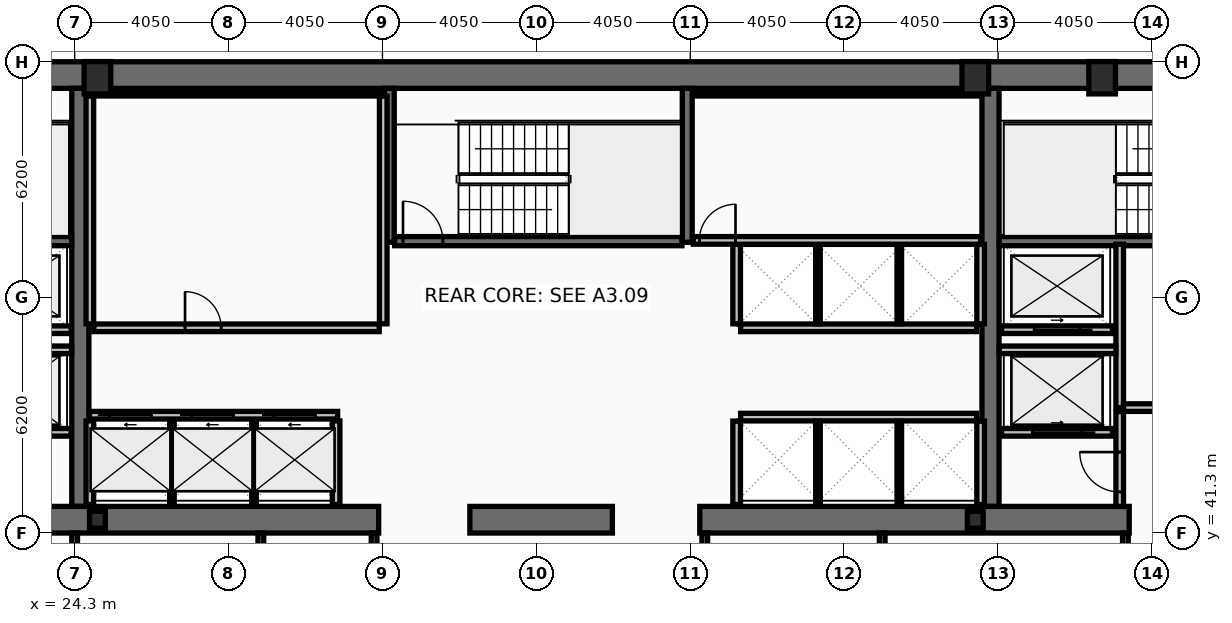
"""IFC4 building model, lengths in metres.
Left out: names, types, materials, properties, quantities, classifications, styles, units other than length and angle.
Written with IfcOpenShell. Run it as: python <this file> out.ifc"""

import sys

from ifc_helpers import new_model, si_unit, direction, frame, frame_2d, origin, origin_2d, place, context, subcontext, project, spatial, rectangle, hollow_rectangle, i_section, extrude, element, fill, save


model = new_model("IFC4")
c1 = context("Model", 3, precision=1e-05, world=origin(), true_north=direction((0.0, 1.0)))
c2 = subcontext(c1, "Body", "Model", "MODEL_VIEW")
j1 = project(units=[si_unit("LENGTHUNIT", "METRE"), si_unit("PLANEANGLEUNIT", "RADIAN")], contexts=[c1])
p1 = place(None, origin())
s1 = spatial("IfcSite", under=j1, at=p1, CompositionType="ELEMENT")
p2 = place(p1, origin())
s2 = spatial("IfcBuilding", under=s1, at=p2, CompositionType="ELEMENT")
p3 = place(p2, frame((0.0, 0.0, 157.8)))
s3 = spatial("IfcBuildingStorey", under=s2, at=p3, CompositionType="ELEMENT", Elevation=157.8)
p4 = place(p3, frame((16.2, 53.35, 0.0), z_axis=(0.0, 0.0, 1.0), x_axis=(1.0, 0.0, 0.0)))
e1 = element("IfcWall", 1, at=p4, inside=s3, PredefinedType="SHEAR", context=c2, shape_type="SweptSolid", body=[
    extrude(rectangle(XDim=40.5, YDim=0.7, at=frame_2d((20.25, 0.0))), origin(), (0.0, 0.0, 1.0), 3.44),
])
for number, where, z_axis, x_axis in (
    (2, (24.45, 42.0, 0.0), (0.0, 0.0, 1.0), (0.0, 1.0, 0.0)),
    (3, (48.4, 42.0, 0.0), (0.0, 0.0, 1.0), (0.0, 1.0, 0.0)),
):
    element("IfcWall", number, at=place(p3, frame(where, z_axis=z_axis, x_axis=x_axis)), inside=s3, PredefinedType="SHEAR", context=c2, shape_type="SweptSolid", body=[
        extrude(rectangle(XDim=11.0, YDim=0.45, at=frame_2d((5.5, 0.0))), origin(), (0.0, 0.0, 1.0), 3.44),
    ])
p5 = place(p3, frame((32.3, 41.65, 0.0), z_axis=(0.0, 0.0, 1.0), x_axis=(-1.0, 0.0, 0.0)))
e4 = element("IfcWall", 4, at=p5, inside=s3, PredefinedType="SHEAR", context=c2, shape_type="SweptSolid", body=[
    extrude(rectangle(XDim=11.45, YDim=0.7, at=frame_2d((5.725, 0.0))), origin(), (0.0, 0.0, 1.0), 3.44),
])
p6 = place(p3, frame((38.45, 41.65, 0.0), z_axis=(0.0, 0.0, 1.0), x_axis=(-1.0, 0.0, 0.0)))
e5 = element("IfcWall", 5, at=p6, inside=s3, PredefinedType="SHEAR", context=c2, shape_type="SweptSolid", body=[
    extrude(rectangle(XDim=3.75, YDim=0.7, at=frame_2d((1.875, 0.0))), origin(), (0.0, 0.0, 1.0), 3.44),
])
p7 = place(p3, frame((52.05, 41.65, 0.0), z_axis=(0.0, 0.0, 1.0), x_axis=(-1.0, 0.0, 0.0)))
e6 = element("IfcWall", 6, at=p7, inside=s3, PredefinedType="SHEAR", context=c2, shape_type="SweptSolid", body=[
    extrude(rectangle(XDim=11.3, YDim=0.7, at=frame_2d((5.65, 0.0))), origin(), (0.0, 0.0, 1.0), 3.44),
])
for number, where, z_axis, x_axis in (
    (7, (32.58, 48.95, 0.0), (0.0, 0.0, 1.0), (0.0, 1.0, 0.0)),
    (8, (40.42, 48.95, 0.0), (0.0, 0.0, 1.0), (0.0, 1.0, 0.0)),
):
    element("IfcWall", number, at=place(p3, frame(where, z_axis=z_axis, x_axis=x_axis)), inside=s3, PredefinedType="SHEAR", context=c2, shape_type="SweptSolid", body=[
        extrude(rectangle(XDim=4.05, YDim=0.26, at=frame_2d((2.025, 0.0))), origin(), (0.0, 0.0, 1.0), 3.44),
    ])
p8 = place(p3, frame((16.9, 48.98, 0.0), z_axis=(0.0, 0.0, 1.0), x_axis=(1.0, 0.0, 0.0)))
e9 = element("IfcWall", 9, at=p8, inside=s3, PredefinedType="SHEAR", context=c2, shape_type="SweptSolid", body=[
    extrude(rectangle(XDim=7.32, YDim=0.24, at=frame_2d((3.66, 0.0))), origin(), (0.0, 0.0, 1.0), 3.44),
])
p9 = place(p8, frame((0.22, 0.0, 0.0)))
e10 = element("IfcOpeningElement", 10, at=p9, cuts=e9, PredefinedType="OPENING", context=c2, shape_type="SweptSolid", body=[
    extrude(rectangle(XDim=1.05, YDim=2.15, at=frame_2d((0.525, 1.075))), frame((0.0, 0.13, 0.0), z_axis=(0.0, -1.0, 0.0), x_axis=(1.0, 0.0, 0.0)), (0.0, 0.0, 1.0), 0.26),
])
p10 = place(p3, frame((48.63, 48.98, 0.0), z_axis=(0.0, 0.0, 1.0), x_axis=(1.0, 0.0, 0.0)))
e11 = element("IfcWall", 11, at=p10, inside=s3, PredefinedType="SHEAR", context=c2, shape_type="SweptSolid", body=[
    extrude(rectangle(XDim=7.37, YDim=0.24, at=frame_2d((3.685, 0.0))), origin(), (0.0, 0.0, 1.0), 3.44),
])
p11 = place(p10, frame((6.1, 0.0, 0.0)))
e12 = element("IfcOpeningElement", 12, at=p11, cuts=e11, PredefinedType="OPENING", context=c2, shape_type="SweptSolid", body=[
    extrude(rectangle(XDim=1.05, YDim=2.15, at=frame_2d((0.525, 1.075))), frame((0.0, 0.13, 0.0), z_axis=(0.0, -1.0, 0.0), x_axis=(1.0, 0.0, 0.0)), (0.0, 0.0, 1.0), 0.26),
])
p12 = place(p3, frame((32.72, 48.98, 0.0), z_axis=(0.0, 0.0, 1.0), x_axis=(1.0, 0.0, 0.0)))
e13 = element("IfcWall", 13, at=p12, inside=s3, PredefinedType="SHEAR", context=c2, shape_type="SweptSolid", body=[
    extrude(rectangle(XDim=7.56, YDim=0.24, at=frame_2d((3.78, 0.0))), origin(), (0.0, 0.0, 1.0), 3.44),
])
p13 = place(p12, frame((0.22, 0.0, 0.0)))
e14 = element("IfcOpeningElement", 14, at=p13, cuts=e13, PredefinedType="OPENING", context=c2, shape_type="SweptSolid", body=[
    extrude(rectangle(XDim=1.05, YDim=2.15, at=frame_2d((0.525, 1.075))), frame((0.0, 0.13, 0.0), z_axis=(0.0, -1.0, 0.0), x_axis=(1.0, 0.0, 0.0)), (0.0, 0.0, 1.0), 0.26),
])
for number, where, z_axis, x_axis in (
    (15, (24.9, 53.28, 0.0), (0.0, 0.0, 1.0), (1.0, 0.0, 0.0)),
    (16, (48.0, 53.28, 0.0), (0.0, 0.0, 1.0), (1.0, 0.0, 0.0)),
    (17, (51.337, 53.28, 0.0), (0.0, 0.0, 1.0), (1.0, 0.0, 0.0)),
):
    element("IfcColumn", number, at=place(p3, frame(where, z_axis=z_axis, x_axis=x_axis)), inside=s3, PredefinedType="COLUMN", context=c2, shape_type="SweptSolid", body=[
        extrude(hollow_rectangle(XDim=0.7, YDim=0.85, WallThickness=0.05, at=origin_2d()), origin(), (0.0, 0.0, 1.0), 3.6),
    ])
for number, where, z_axis, x_axis in (
    (18, (24.9, 41.65, 0.0), (0.0, 0.0, 1.0), (1.0, 0.0, 0.0)),
    (19, (48.0, 41.65, 0.0), (0.0, 0.0, 1.0), (1.0, 0.0, 0.0)),
):
    element("IfcColumn", number, at=place(p3, frame(where, z_axis=z_axis, x_axis=x_axis)), inside=s3, PredefinedType="COLUMN", context=c2, shape_type="SweptSolid", body=[
        extrude(i_section(OverallWidth=0.416, OverallDepth=0.446, WebThickness=0.039, FlangeThickness=0.063, at=origin_2d()), origin(), (0.0, 0.0, 1.0), 3.6),
    ])
p14 = place(p3, frame((24.69, 44.4, 0.0), z_axis=(0.0, 0.0, 1.0), x_axis=(1.0, 0.0, 0.0)))
e20 = element("IfcWall", 20, at=p14, inside=s3, PredefinedType="PARTITIONING", context=c2, shape_type="SweptSolid", body=[
    extrude(rectangle(XDim=6.53, YDim=0.2, at=frame_2d((3.265, 0.0))), origin(), (0.0, 0.0, 1.0), 3.44),
])
p15 = place(p14, frame((0.53, 0.0, 0.0)))
e21 = element("IfcOpeningElement", 21, at=p15, cuts=e20, PredefinedType="OPENING", context=c2, shape_type="SweptSolid", body=[
    extrude(rectangle(XDim=1.1, YDim=2.18, at=frame_2d((0.55, 1.09))), frame((0.0, 0.11, 0.0), z_axis=(0.0, -1.0, 0.0), x_axis=(1.0, 0.0, 0.0)), (0.0, 0.0, 1.0), 0.22),
])
p16 = place(p14, frame((2.69, 0.0, 0.0)))
e22 = element("IfcOpeningElement", 22, at=p16, cuts=e20, PredefinedType="OPENING", context=c2, shape_type="SweptSolid", body=[
    extrude(rectangle(XDim=1.1, YDim=2.18, at=frame_2d((0.55, 1.09))), frame((0.0, 0.11, 0.0), z_axis=(0.0, -1.0, 0.0), x_axis=(1.0, 0.0, 0.0)), (0.0, 0.0, 1.0), 0.22),
])
p17 = place(p14, frame((4.85, 0.0, 0.0)))
e23 = element("IfcOpeningElement", 23, at=p17, cuts=e20, PredefinedType="OPENING", context=c2, shape_type="SweptSolid", body=[
    extrude(rectangle(XDim=1.1, YDim=2.18, at=frame_2d((0.55, 1.09))), frame((0.0, 0.11, 0.0), z_axis=(0.0, -1.0, 0.0), x_axis=(1.0, 0.0, 0.0)), (0.0, 0.0, 1.0), 0.22),
])
p18 = place(p3, frame((51.61, 43.95, 0.0), z_axis=(0.0, 0.0, 1.0), x_axis=(-1.0, 0.0, 0.0)))
e24 = element("IfcWall", 24, at=p18, inside=s3, PredefinedType="PARTITIONING", context=c2, shape_type="SweptSolid", body=[
    extrude(rectangle(XDim=2.92, YDim=0.2, at=frame_2d((1.46, 0.0))), origin(), (0.0, 0.0, 1.0), 3.44),
])
p19 = place(p18, frame((0.81, 0.0, 0.0)))
e25 = element("IfcOpeningElement", 25, at=p19, cuts=e24, PredefinedType="OPENING", context=c2, shape_type="SweptSolid", body=[
    extrude(rectangle(XDim=1.3, YDim=2.18, at=frame_2d((0.65, 1.09))), frame((0.0, 0.11, 0.0), z_axis=(0.0, -1.0, 0.0), x_axis=(1.0, 0.0, 0.0)), (0.0, 0.0, 1.0), 0.22),
])
p20 = place(p3, frame((24.21, 43.95, 0.0), z_axis=(0.0, 0.0, 1.0), x_axis=(-1.0, 0.0, 0.0)))
e26 = element("IfcWall", 26, at=p20, inside=s3, PredefinedType="PARTITIONING", context=c2, shape_type="SweptSolid", body=[
    extrude(rectangle(XDim=2.97, YDim=0.2, at=frame_2d((1.485, 0.0))), origin(), (0.0, 0.0, 1.0), 3.44),
])
p21 = place(p20, frame((0.86, 0.0, 0.0)))
e27 = element("IfcOpeningElement", 27, at=p21, cuts=e26, PredefinedType="OPENING", context=c2, shape_type="SweptSolid", body=[
    extrude(rectangle(XDim=1.3, YDim=2.18, at=frame_2d((0.65, 1.09))), frame((0.0, 0.11, 0.0), z_axis=(0.0, -1.0, 0.0), x_axis=(1.0, 0.0, 0.0)), (0.0, 0.0, 1.0), 0.22),
])
p22 = place(p3, frame((51.61, 46.65, 0.0), z_axis=(0.0, 0.0, 1.0), x_axis=(-1.0, 0.0, 0.0)))
e28 = element("IfcWall", 28, at=p22, inside=s3, PredefinedType="PARTITIONING", context=c2, shape_type="SweptSolid", body=[
    extrude(rectangle(XDim=2.92, YDim=0.2, at=frame_2d((1.46, 0.0))), origin(), (0.0, 0.0, 1.0), 3.44),
])
p23 = place(p22, frame((0.86, 0.0, 0.0)))
e29 = element("IfcOpeningElement", 29, at=p23, cuts=e28, PredefinedType="OPENING", context=c2, shape_type="SweptSolid", body=[
    extrude(rectangle(XDim=1.2, YDim=2.18, at=frame_2d((0.6, 1.09))), frame((0.0, 0.11, 0.0), z_axis=(0.0, -1.0, 0.0), x_axis=(1.0, 0.0, 0.0)), (0.0, 0.0, 1.0), 0.22),
])
p24 = place(p3, frame((24.21, 46.65, 0.0), z_axis=(0.0, 0.0, 1.0), x_axis=(-1.0, 0.0, 0.0)))
e30 = element("IfcWall", 30, at=p24, inside=s3, PredefinedType="PARTITIONING", context=c2, shape_type="SweptSolid", body=[
    extrude(rectangle(XDim=2.97, YDim=0.2, at=frame_2d((1.485, 0.0))), origin(), (0.0, 0.0, 1.0), 3.44),
])
p25 = place(p24, frame((0.91, 0.0, 0.0)))
e31 = element("IfcOpeningElement", 31, at=p25, cuts=e30, PredefinedType="OPENING", context=c2, shape_type="SweptSolid", body=[
    extrude(rectangle(XDim=1.2, YDim=2.18, at=frame_2d((0.6, 1.09))), frame((0.0, 0.11, 0.0), z_axis=(0.0, -1.0, 0.0), x_axis=(1.0, 0.0, 0.0)), (0.0, 0.0, 1.0), 0.22),
])
p26 = place(p3, frame((21.2, 46.12, 0.0), z_axis=(0.0, 0.0, 1.0), x_axis=(1.0, 0.0, 0.0)))
e32 = element("IfcWall", 32, at=p26, inside=s3, PredefinedType="PARTITIONING", context=c2, shape_type="SweptSolid", body=[
    extrude(rectangle(XDim=3.02, YDim=0.2, at=frame_2d((1.51, 0.0))), origin(), (0.0, 0.0, 1.0), 3.44),
])
p27 = place(p3, frame((51.8, 44.6, 0.0), z_axis=(0.0, 0.0, 1.0), x_axis=(0.0, 1.0, 0.0)))
e33 = element("IfcWall", 33, at=p27, inside=s3, PredefinedType="PARTITIONING", context=c2, shape_type="SweptSolid", body=[
    extrude(rectangle(XDim=4.3, YDim=0.2, at=frame_2d((2.15, 0.0))), origin(), (0.0, 0.0, 1.0), 3.44),
])
p28 = place(p3, frame((51.9, 44.6, 0.0), z_axis=(0.0, 0.0, 1.0), x_axis=(1.0, 0.0, 0.0)))
e34 = element("IfcWall", 34, at=p28, inside=s3, PredefinedType="PARTITIONING", context=c2, shape_type="SweptSolid", body=[
    extrude(rectangle(XDim=4.1, YDim=0.2, at=frame_2d((2.05, 0.0))), origin(), (0.0, 0.0, 1.0), 3.44),
])
p29 = place(p28, frame((1.15, 0.0, 0.0)))
e35 = element("IfcOpeningElement", 35, at=p29, cuts=e34, PredefinedType="OPENING", context=c2, shape_type="SweptSolid", body=[
    extrude(rectangle(XDim=1.05, YDim=2.15, at=frame_2d((0.525, 1.075))), frame((0.0, 0.11, 0.0), z_axis=(0.0, -1.0, 0.0), x_axis=(1.0, 0.0, 0.0)), (0.0, 0.0, 1.0), 0.22),
])
p30 = place(p3, frame((48.63, 46.12, 0.0), z_axis=(0.0, 0.0, 1.0), x_axis=(1.0, 0.0, 0.0)))
e36 = element("IfcWall", 36, at=p30, inside=s3, PredefinedType="PARTITIONING", context=c2, shape_type="SweptSolid", body=[
    extrude(rectangle(XDim=3.07, YDim=0.2, at=frame_2d((1.535, 0.0))), origin(), (0.0, 0.0, 1.0), 3.44),
])
p31 = place(p3, frame((51.8, 42.0, 0.0), z_axis=(0.0, 0.0, 1.0), x_axis=(0.0, 1.0, 0.0)))
e37 = element("IfcWall", 37, at=p31, inside=s3, PredefinedType="PARTITIONING", context=c2, shape_type="SweptSolid", body=[
    extrude(rectangle(XDim=2.495, YDim=0.2, at=frame_2d((1.248, 0.0))), origin(), (0.0, 0.0, 1.0), 3.44),
])
p32 = place(p31, frame((0.38, 0.0, 0.0)))
e38 = element("IfcOpeningElement", 38, at=p32, cuts=e37, PredefinedType="OPENING", context=c2, shape_type="SweptSolid", body=[
    extrude(rectangle(XDim=1.05, YDim=2.15, at=frame_2d((0.525, 1.075))), frame((0.0, 0.11, 0.0), z_axis=(0.0, -1.0, 0.0), x_axis=(1.0, 0.0, 0.0)), (0.0, 0.0, 1.0), 0.22),
])
for number, where, z_axis, x_axis in (
    (39, (24.7, 46.805, 0.0), (0.0, 0.0, 1.0), (0.0, 1.0, 0.0)),
    (40, (32.42, 46.805, 0.0), (0.0, 0.0, 1.0), (0.0, 1.0, 0.0)),
):
    element("IfcWall", number, at=place(p3, frame(where, z_axis=z_axis, x_axis=x_axis)), inside=s3, PredefinedType="PARTITIONING", context=c2, shape_type="SweptSolid", body=[
        extrude(rectangle(XDim=5.99, YDim=0.2, at=frame_2d((2.995, 0.0))), origin(), (0.0, 0.0, 1.0), 3.44),
    ])
p33 = place(p3, frame((24.805, 52.86, 0.0), z_axis=(0.0, 0.0, 1.0), x_axis=(1.0, 0.0, 0.0)))
e41 = element("IfcWall", 41, at=p33, inside=s3, PredefinedType="PARTITIONING", context=c2, shape_type="SweptSolid", body=[
    extrude(rectangle(XDim=7.51, YDim=0.12, at=frame_2d((3.755, 0.0))), origin(), (0.0, 0.0, 1.0), 3.44),
])
p34 = place(p3, frame((24.805, 46.7, 0.0), z_axis=(0.0, 0.0, 1.0), x_axis=(1.0, 0.0, 0.0)))
e42 = element("IfcWall", 42, at=p34, inside=s3, PredefinedType="PARTITIONING", context=c2, shape_type="SweptSolid", body=[
    extrude(rectangle(XDim=7.51, YDim=0.2, at=frame_2d((3.755, 0.0))), origin(), (0.0, 0.0, 1.0), 3.44),
])
p35 = place(p34, frame((2.4, 0.0, 0.0)))
e43 = element("IfcOpeningElement", 43, at=p35, cuts=e42, PredefinedType="OPENING", context=c2, shape_type="SweptSolid", body=[
    extrude(rectangle(XDim=0.95, YDim=2.1, at=frame_2d((0.475, 1.05))), frame((0.0, 0.11, 0.0), z_axis=(0.0, -1.0, 0.0), x_axis=(1.0, 0.0, 0.0)), (0.0, 0.0, 1.0), 0.22),
])
for number, where, z_axis, x_axis in (
    (44, (24.7, 42.05, 0.0), (0.0, 0.0, 1.0), (0.0, 1.0, 0.0)),
    (45, (31.18, 42.05, 0.0), (0.0, 0.0, 1.0), (0.0, 1.0, 0.0)),
):
    element("IfcWall", number, at=place(p3, frame(where, z_axis=z_axis, x_axis=x_axis)), inside=s3, PredefinedType="PARTITIONING", context=c2, shape_type="SweptSolid", body=[
        extrude(rectangle(XDim=2.2, YDim=0.2, at=frame_2d((1.1, 0.0))), origin(), (0.0, 0.0, 1.0), 3.44),
    ])
for number, where, z_axis, x_axis in (
    (46, (26.86, 42.05, 0.0), (0.0, 0.0, 1.0), (0.0, 1.0, 0.0)),
    (47, (29.02, 42.05, 0.0), (0.0, 0.0, 1.0), (0.0, 1.0, 0.0)),
):
    element("IfcWall", number, at=place(p3, frame(where, z_axis=z_axis, x_axis=x_axis)), inside=s3, PredefinedType="PARTITIONING", context=c2, shape_type="SweptSolid", body=[
        extrude(rectangle(XDim=2.2, YDim=0.12, at=frame_2d((1.1, 0.0))), origin(), (0.0, 0.0, 1.0), 3.44),
    ])
p36 = place(p3, frame((41.825, 46.7, 0.0), z_axis=(0.0, 0.0, 1.0), x_axis=(1.0, 0.0, 0.0)))
e48 = element("IfcWall", 48, at=p36, inside=s3, PredefinedType="PARTITIONING", context=c2, shape_type="SweptSolid", body=[
    extrude(rectangle(XDim=6.21, YDim=0.2, at=frame_2d((3.105, 0.0))), origin(), (0.0, 0.0, 1.0), 3.44),
])
for number, where, z_axis, x_axis in (
    (49, (41.72, 46.805, 0.0), (0.0, 0.0, 1.0), (0.0, 1.0, 0.0)),
    (50, (48.14, 46.805, 0.0), (0.0, 0.0, 1.0), (0.0, 1.0, 0.0)),
):
    element("IfcWall", number, at=place(p3, frame(where, z_axis=z_axis, x_axis=x_axis)), inside=s3, PredefinedType="PARTITIONING", context=c2, shape_type="SweptSolid", body=[
        extrude(rectangle(XDim=2.09, YDim=0.2, at=frame_2d((1.045, 0.0))), origin(), (0.0, 0.0, 1.0), 3.44),
    ])
for number, where, z_axis, x_axis in (
    (51, (43.86, 46.805, 0.0), (0.0, 0.0, 1.0), (0.0, 1.0, 0.0)),
    (52, (46.0, 46.805, 0.0), (0.0, 0.0, 1.0), (0.0, 1.0, 0.0)),
):
    element("IfcWall", number, at=place(p3, frame(where, z_axis=z_axis, x_axis=x_axis)), inside=s3, PredefinedType="PARTITIONING", context=c2, shape_type="SweptSolid", body=[
        extrude(rectangle(XDim=2.09, YDim=0.12, at=frame_2d((1.045, 0.0))), origin(), (0.0, 0.0, 1.0), 3.44),
    ])
p37 = place(p3, frame((41.825, 44.35, 0.0), z_axis=(0.0, 0.0, 1.0), x_axis=(1.0, 0.0, 0.0)))
e53 = element("IfcWall", 53, at=p37, inside=s3, PredefinedType="PARTITIONING", context=c2, shape_type="SweptSolid", body=[
    extrude(rectangle(XDim=6.21, YDim=0.2, at=frame_2d((3.105, 0.0))), origin(), (0.0, 0.0, 1.0), 3.44),
])
for number, where, z_axis, x_axis in (
    (54, (41.72, 42.05, 0.0), (0.0, 0.0, 1.0), (0.0, 1.0, 0.0)),
    (55, (48.14, 42.05, 0.0), (0.0, 0.0, 1.0), (0.0, 1.0, 0.0)),
):
    element("IfcWall", number, at=place(p3, frame(where, z_axis=z_axis, x_axis=x_axis)), inside=s3, PredefinedType="PARTITIONING", context=c2, shape_type="SweptSolid", body=[
        extrude(rectangle(XDim=2.195, YDim=0.2, at=frame_2d((1.098, 0.0))), origin(), (0.0, 0.0, 1.0), 3.44),
    ])
for number, where, z_axis, x_axis in (
    (56, (43.86, 42.05, 0.0), (0.0, 0.0, 1.0), (0.0, 1.0, 0.0)),
    (57, (46.0, 42.05, 0.0), (0.0, 0.0, 1.0), (0.0, 1.0, 0.0)),
):
    element("IfcWall", number, at=place(p3, frame(where, z_axis=z_axis, x_axis=x_axis)), inside=s3, PredefinedType="PARTITIONING", context=c2, shape_type="SweptSolid", body=[
        extrude(rectangle(XDim=2.195, YDim=0.12, at=frame_2d((1.098, 0.0))), origin(), (0.0, 0.0, 1.0), 3.44),
    ])
p38 = place(p3, frame((40.58, 52.86, 0.0), z_axis=(0.0, 0.0, 1.0), x_axis=(1.0, 0.0, 0.0)))
e58 = element("IfcWall", 58, at=p38, inside=s3, PredefinedType="PARTITIONING", context=c2, shape_type="SweptSolid", body=[
    extrude(rectangle(XDim=7.56, YDim=0.12, at=frame_2d((3.78, 0.0))), origin(), (0.0, 0.0, 1.0), 3.44),
])
p39 = place(p3, frame((40.58, 49.0, 0.0), z_axis=(0.0, 0.0, 1.0), x_axis=(1.0, 0.0, 0.0)))
e59 = element("IfcWall", 59, at=p39, inside=s3, PredefinedType="PARTITIONING", context=c2, shape_type="SweptSolid", body=[
    extrude(rectangle(XDim=7.56, YDim=0.2, at=frame_2d((3.78, 0.0))), origin(), (0.0, 0.0, 1.0), 3.44),
])
p40 = place(p39, frame((0.16, 0.0, 0.0)))
e60 = element("IfcOpeningElement", 60, at=p40, cuts=e59, PredefinedType="OPENING", context=c2, shape_type="SweptSolid", body=[
    extrude(rectangle(XDim=0.95, YDim=2.1, at=frame_2d((0.475, 1.05))), frame((0.0, 0.11, 0.0), z_axis=(0.0, -1.0, 0.0), x_axis=(1.0, 0.0, 0.0)), (0.0, 0.0, 1.0), 0.22),
])
for number, where, z_axis, x_axis in (
    (61, (24.3, 38.28, 0.0), (0.0, 0.0, 1.0), (0.0, 1.0, 0.0)),
    (62, (29.2, 38.28, 0.0), (0.0, 0.0, 1.0), (0.0, 1.0, 0.0)),
    (63, (32.18, 38.28, 0.0), (0.0, 0.0, 1.0), (0.0, 1.0, 0.0)),
    (64, (40.88, 38.28, 0.0), (0.0, 0.0, 1.0), (0.0, 1.0, 0.0)),
    (65, (45.55, 38.28, 0.0), (0.0, 0.0, 1.0), (0.0, 1.0, 0.0)),
    (66, (51.95, 38.28, 0.0), (0.0, 0.0, 1.0), (0.0, 1.0, 0.0)),
):
    element("IfcWall", number, at=place(p3, frame(where, z_axis=z_axis, x_axis=x_axis)), inside=s3, PredefinedType="PARTITIONING", context=c2, shape_type="SweptSolid", body=[
        extrude(rectangle(XDim=3.02, YDim=0.15, at=frame_2d((1.51, 0.0))), origin(), (0.0, 0.0, 1.0), 3.44),
    ])
p41 = place(p13, origin())
e67 = element("IfcDoor", 67, at=p41, inside=s3, OperationType="SINGLE_SWING_LEFT", PredefinedType="DOOR", context=c2, shape_type="SweptSolid", body=[
    extrude(rectangle(XDim=1.05, YDim=2.15, at=frame_2d((0.525, 1.075))), frame((0.0, 0.025, 0.0), z_axis=(0.0, -1.0, 0.0), x_axis=(1.0, 0.0, 0.0)), (0.0, 0.0, 1.0), 0.05),
])
fill(e14, e67)
p42 = place(p15, origin())
e68 = element("IfcDoor", 68, at=p42, inside=s3, OperationType="SLIDING_TO_LEFT", PredefinedType="DOOR", context=c2, shape_type="SweptSolid", body=[
    extrude(rectangle(XDim=1.1, YDim=2.18, at=frame_2d((0.55, 1.09))), frame((0.0, 0.025, 0.0), z_axis=(0.0, -1.0, 0.0), x_axis=(1.0, 0.0, 0.0)), (0.0, 0.0, 1.0), 0.05),
])
fill(e21, e68)
p43 = place(p16, origin())
e69 = element("IfcDoor", 69, at=p43, inside=s3, OperationType="SLIDING_TO_LEFT", PredefinedType="DOOR", context=c2, shape_type="SweptSolid", body=[
    extrude(rectangle(XDim=1.1, YDim=2.18, at=frame_2d((0.55, 1.09))), frame((0.0, 0.025, 0.0), z_axis=(0.0, -1.0, 0.0), x_axis=(1.0, 0.0, 0.0)), (0.0, 0.0, 1.0), 0.05),
])
fill(e22, e69)
p44 = place(p17, origin())
e70 = element("IfcDoor", 70, at=p44, inside=s3, OperationType="SLIDING_TO_LEFT", PredefinedType="DOOR", context=c2, shape_type="SweptSolid", body=[
    extrude(rectangle(XDim=1.1, YDim=2.18, at=frame_2d((0.55, 1.09))), frame((0.0, 0.025, 0.0), z_axis=(0.0, -1.0, 0.0), x_axis=(1.0, 0.0, 0.0)), (0.0, 0.0, 1.0), 0.05),
])
fill(e23, e70)
p45 = place(p19, origin())
e71 = element("IfcDoor", 71, at=p45, inside=s3, OperationType="SLIDING_TO_LEFT", PredefinedType="DOOR", context=c2, shape_type="SweptSolid", body=[
    extrude(rectangle(XDim=1.3, YDim=2.18, at=frame_2d((0.65, 1.09))), frame((0.0, 0.025, 0.0), z_axis=(0.0, -1.0, 0.0), x_axis=(1.0, 0.0, 0.0)), (0.0, 0.0, 1.0), 0.05),
])
fill(e25, e71)
p46 = place(p23, origin())
e72 = element("IfcDoor", 72, at=p46, inside=s3, OperationType="SLIDING_TO_LEFT", PredefinedType="DOOR", context=c2, shape_type="SweptSolid", body=[
    extrude(rectangle(XDim=1.2, YDim=2.18, at=frame_2d((0.6, 1.09))), frame((0.0, 0.025, 0.0), z_axis=(0.0, -1.0, 0.0), x_axis=(1.0, 0.0, 0.0)), (0.0, 0.0, 1.0), 0.05),
])
fill(e29, e72)
p47 = place(p32, origin())
e73 = element("IfcDoor", 73, at=p47, inside=s3, OperationType="SINGLE_SWING_RIGHT", PredefinedType="DOOR", context=c2, shape_type="SweptSolid", body=[
    extrude(rectangle(XDim=1.05, YDim=2.15, at=frame_2d((0.525, 1.075))), frame((0.0, 0.025, 0.0), z_axis=(0.0, -1.0, 0.0), x_axis=(1.0, 0.0, 0.0)), (0.0, 0.0, 1.0), 0.05),
])
fill(e38, e73)
p48 = place(p35, origin())
e74 = element("IfcDoor", 74, at=p48, inside=s3, OperationType="SINGLE_SWING_LEFT", PredefinedType="DOOR", context=c2, shape_type="SweptSolid", body=[
    extrude(rectangle(XDim=0.95, YDim=2.1, at=frame_2d((0.475, 1.05))), frame((0.0, 0.025, 0.0), z_axis=(0.0, -1.0, 0.0), x_axis=(1.0, 0.0, 0.0)), (0.0, 0.0, 1.0), 0.05),
])
fill(e43, e74)
p49 = place(p40, origin())
e75 = element("IfcDoor", 75, at=p49, inside=s3, OperationType="SINGLE_SWING_RIGHT", PredefinedType="DOOR", context=c2, shape_type="SweptSolid", body=[
    extrude(rectangle(XDim=0.95, YDim=2.1, at=frame_2d((0.475, 1.05))), frame((0.0, 0.025, 0.0), z_axis=(0.0, -1.0, 0.0), x_axis=(1.0, 0.0, 0.0)), (0.0, 0.0, 1.0), 0.05),
])
fill(e60, e75)
save(model, sys.argv[1])
